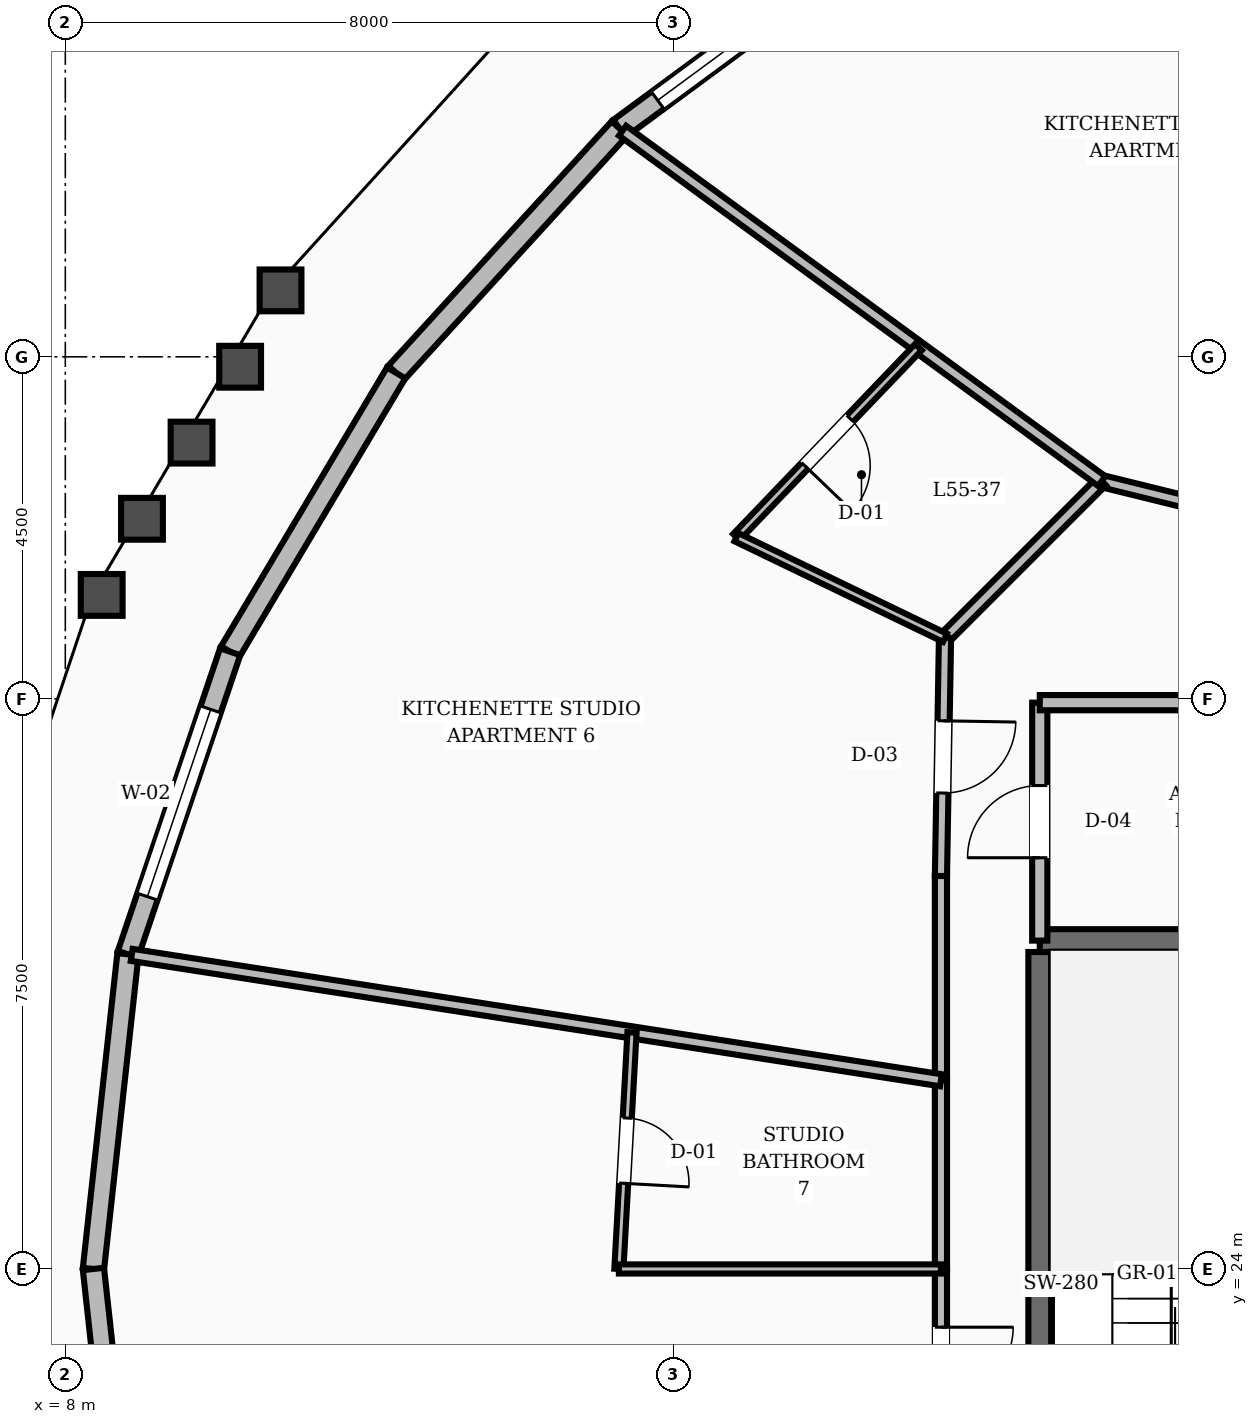
"""IFC4 building model, lengths in metres.
Left out: names, types, materials, properties, quantities, classifications, styles, units other than length and angle.
Written with IfcOpenShell. Run it as: python <this file> out.ifc"""

import sys

from ifc_helpers import new_model, si_unit, direction, frame, frame_2d, origin, place, context, subcontext, project, spatial, rectangle, extrude, element, fill, save


model = new_model("IFC4")
c1 = context("Model", 3, precision=1e-05, world=origin(), true_north=direction((0.0, 1.0)))
c2 = subcontext(c1, "Body", "Model", "MODEL_VIEW")
j1 = project(units=[si_unit("LENGTHUNIT", "METRE"), si_unit("PLANEANGLEUNIT", "RADIAN")], contexts=[c1])
p1 = place(None, origin())
s1 = spatial("IfcSite", under=j1, at=p1, CompositionType="ELEMENT")
p2 = place(p1, origin())
s2 = spatial("IfcBuilding", under=s1, at=p2, CompositionType="ELEMENT")
p3 = place(p2, frame((0.0, 0.0, 214.8)))
s3 = spatial("IfcBuildingStorey", under=s2, at=p3, CompositionType="ELEMENT", Elevation=214.8)
p4 = place(p3, frame((20.82, 19.43, 0.0), z_axis=(0.0, 0.0, 1.0), x_axis=(0.0, 1.0, 0.0)))
e1 = element("IfcWall", 1, at=p4, inside=s3, PredefinedType="SHEAR", context=c2, shape_type="SweptSolid", body=[
    extrude(rectangle(XDim=8.74, YDim=0.3, at=frame_2d((4.37, 0.0))), origin(), (0.0, 0.0, 1.0), 3.6),
])
p5 = place(p3, frame((20.82, 28.32, 0.0), z_axis=(0.0, 0.0, 1.0), x_axis=(1.0, 0.0, 0.0)))
e2 = element("IfcWall", 2, at=p5, inside=s3, PredefinedType="SHEAR", context=c2, shape_type="SweptSolid", body=[
    extrude(rectangle(XDim=3.6, YDim=0.3, at=frame_2d((1.8, 0.0))), origin(), (0.0, 0.0, 1.0), 3.6),
])
p6 = place(p3, frame((18.872, 41.643, 0.0), z_axis=(0.0, 0.0, 1.0), x_axis=(-0.8050103103, -0.593260819801, 0.0)))
e3 = element("IfcWall", 3, at=p6, inside=s3, PredefinedType="STANDARD", context=c2, shape_type="SweptSolid", body=[
    extrude(rectangle(XDim=4.448, YDim=0.28, at=frame_2d((2.224, 0.0))), origin(), (0.0, 0.0, 1.0), 2.88),
])
p7 = place(p6, frame((0.624, 0.0, 0.8)))
e4 = element("IfcOpeningElement", 4, at=p7, cuts=e3, PredefinedType="OPENING", context=c2, shape_type="SweptSolid", body=[
    extrude(rectangle(XDim=3.2, YDim=1.65, at=frame_2d((1.6, 0.825))), frame((0.0, 0.15, 0.0), z_axis=(0.0, -1.0, 0.0), x_axis=(1.0, 0.0, 0.0)), (0.0, 0.0, 1.0), 0.3),
])
p8 = place(p3, frame((15.291, 39.004, 0.0), z_axis=(0.0, 0.0, 1.0), x_axis=(-0.674642715371, -0.73814443478, 0.0)))
e5 = element("IfcWall", 5, at=p8, inside=s3, PredefinedType="STANDARD", context=c2, shape_type="SweptSolid", body=[
    extrude(rectangle(XDim=4.356, YDim=0.28, at=frame_2d((2.178, 0.0))), origin(), (0.0, 0.0, 1.0), 2.88),
])
p9 = place(p3, frame((12.352, 35.789, 0.0), z_axis=(0.0, 0.0, 1.0), x_axis=(-0.511481849, -0.859294081292, 0.0)))
e6 = element("IfcWall", 6, at=p9, inside=s3, PredefinedType="STANDARD", context=c2, shape_type="SweptSolid", body=[
    extrude(rectangle(XDim=4.269, YDim=0.28, at=frame_2d((2.135, 0.0))), origin(), (0.0, 0.0, 1.0), 2.88),
])
p10 = place(p3, frame((10.169, 32.12, 0.0), z_axis=(0.0, 0.0, 1.0), x_axis=(-0.320060327551, -0.947397164197, 0.0)))
e7 = element("IfcWall", 7, at=p10, inside=s3, PredefinedType="STANDARD", context=c2, shape_type="SweptSolid", body=[
    extrude(rectangle(XDim=4.201, YDim=0.28, at=frame_2d((2.101, 0.0))), origin(), (0.0, 0.0, 1.0), 2.88),
])
p11 = place(p10, frame((0.801, 0.0, 0.8)))
e8 = element("IfcOpeningElement", 8, at=p11, cuts=e7, PredefinedType="OPENING", context=c2, shape_type="SweptSolid", body=[
    extrude(rectangle(XDim=2.6, YDim=1.65, at=frame_2d((1.3, 0.825))), frame((0.0, 0.15, 0.0), z_axis=(0.0, -1.0, 0.0), x_axis=(1.0, 0.0, 0.0)), (0.0, 0.0, 1.0), 0.3),
])
for number, where, z_axis, x_axis in (
    (9, (8.824, 28.14, 0.0), (0.0, 0.0, 1.0), (-0.109, -0.994, 0.0)),
    (10, (8.37, 24.0, 0.0), (0.0, 0.0, 1.0), (0.109, -0.994, 0.0)),
):
    element("IfcWall", number, at=place(p3, frame(where, z_axis=z_axis, x_axis=x_axis)), inside=s3, PredefinedType="STANDARD", context=c2, shape_type="SweptSolid", body=[
        extrude(rectangle(XDim=4.165, YDim=0.28, at=frame_2d((2.082, 0.0))), origin(), (0.0, 0.0, 1.0), 2.88),
    ])
p12 = place(p3, frame((20.82, 28.32, 0.0), z_axis=(0.0, 0.0, 1.0), x_axis=(0.0, 1.0, 0.0)))
e11 = element("IfcWall", 11, at=p12, inside=s3, PredefinedType="SOLIDWALL", context=c2, shape_type="SweptSolid", body=[
    extrude(rectangle(XDim=3.13, YDim=0.2, at=frame_2d((1.565, 0.0))), origin(), (0.0, 0.0, 1.0), 2.87),
])
p13 = place(p12, frame((1.09, 0.0, 0.0)))
e12 = element("IfcOpeningElement", 12, at=p13, cuts=e11, PredefinedType="OPENING", context=c2, shape_type="SweptSolid", body=[
    extrude(rectangle(XDim=0.95, YDim=2.1, at=frame_2d((0.475, 1.05))), frame((0.0, 0.11, 0.0), z_axis=(0.0, -1.0, 0.0), x_axis=(1.0, 0.0, 0.0)), (0.0, 0.0, 1.0), 0.22),
])
p14 = place(p3, frame((20.82, 31.45, 0.0), z_axis=(0.0, 0.0, 1.0), x_axis=(1.0, 0.0, 0.0)))
e13 = element("IfcWall", 13, at=p14, inside=s3, PredefinedType="SOLIDWALL", context=c2, shape_type="SweptSolid", body=[
    extrude(rectangle(XDim=3.98, YDim=0.2, at=frame_2d((1.99, 0.0))), origin(), (0.0, 0.0, 1.0), 2.87),
])
p15 = place(p3, frame((25.752, 33.35, 0.0), z_axis=(0.0, 0.0, 1.0), x_axis=(-0.970939799552, 0.239323850978, 0.0)))
e14 = element("IfcWall", 14, at=p15, inside=s3, PredefinedType="SOLIDWALL", context=c2, shape_type="SweptSolid", body=[
    extrude(rectangle(XDim=4.241, YDim=0.16, at=frame_2d((2.12, 0.0))), origin(), (0.0, 0.0, 1.0), 2.87),
])
p16 = place(p3, frame((21.635, 34.365, 0.0), z_axis=(0.0, 0.0, 1.0), x_axis=(-0.707106781187, -0.707106781187, 0.0)))
e15 = element("IfcWall", 15, at=p16, inside=s3, PredefinedType="SOLIDWALL", context=c2, shape_type="SweptSolid", body=[
    extrude(rectangle(XDim=2.916, YDim=0.16, at=frame_2d((1.458, 0.0))), origin(), (0.0, 0.0, 1.0), 2.87),
])
p17 = place(p3, frame((19.573, 32.303, 0.0), z_axis=(0.0, 0.0, 1.0), x_axis=(-0.016981035134, -0.999855811828, 0.0)))
e16 = element("IfcWall", 16, at=p17, inside=s3, PredefinedType="SOLIDWALL", context=c2, shape_type="SweptSolid", body=[
    extrude(rectangle(XDim=3.134, YDim=0.16, at=frame_2d((1.567, 0.0))), origin(), (0.0, 0.0, 1.0), 2.87),
])
p18 = place(p17, frame((1.092, 0.0, 0.0)))
e17 = element("IfcOpeningElement", 17, at=p18, cuts=e16, PredefinedType="OPENING", context=c2, shape_type="SweptSolid", body=[
    extrude(rectangle(XDim=0.95, YDim=2.1, at=frame_2d((0.475, 1.05))), frame((0.0, 0.09, 0.0), z_axis=(0.0, -1.0, 0.0), x_axis=(1.0, 0.0, 0.0)), (0.0, 0.0, 1.0), 0.18),
])
p19 = place(p3, frame((19.52, 29.169, 0.0), z_axis=(0.0, 0.0, 1.0), x_axis=(0.0, -1.0, 0.0)))
e18 = element("IfcWall", 18, at=p19, inside=s3, PredefinedType="SOLIDWALL", context=c2, shape_type="SweptSolid", body=[
    extrude(rectangle(XDim=2.687, YDim=0.16, at=frame_2d((1.344, 0.0))), origin(), (0.0, 0.0, 1.0), 2.87),
])
p20 = place(p3, frame((19.52, 26.482, 0.0), z_axis=(0.0, 0.0, 1.0), x_axis=(0.0, -1.0, 0.0)))
e19 = element("IfcWall", 19, at=p20, inside=s3, PredefinedType="SOLIDWALL", context=c2, shape_type="SweptSolid", body=[
    extrude(rectangle(XDim=2.482, YDim=0.16, at=frame_2d((1.241, 0.0))), origin(), (0.0, 0.0, 1.0), 2.87),
])
p21 = place(p3, frame((19.52, 24.0, 0.0), z_axis=(0.0, 0.0, 1.0), x_axis=(0.0, -1.0, 0.0)))
e20 = element("IfcWall", 20, at=p21, inside=s3, PredefinedType="SOLIDWALL", context=c2, shape_type="SweptSolid", body=[
    extrude(rectangle(XDim=2.482, YDim=0.16, at=frame_2d((1.241, 0.0))), origin(), (0.0, 0.0, 1.0), 2.87),
])
p22 = place(p21, frame((0.766, 0.0, 0.0)))
e21 = element("IfcOpeningElement", 21, at=p22, cuts=e20, PredefinedType="OPENING", context=c2, shape_type="SweptSolid", body=[
    extrude(rectangle(XDim=0.95, YDim=2.1, at=frame_2d((0.475, 1.05))), frame((0.0, 0.09, 0.0), z_axis=(0.0, -1.0, 0.0), x_axis=(1.0, 0.0, 0.0)), (0.0, 0.0, 1.0), 0.18),
])
p23 = place(p3, frame((21.635, 34.365, 0.0), z_axis=(0.0, 0.0, 1.0), x_axis=(-0.807193456396, 0.5902869844, 0.0)))
e22 = element("IfcWall", 22, at=p23, inside=s3, PredefinedType="SOLIDWALL", context=c2, shape_type="SweptSolid", body=[
    extrude(rectangle(XDim=7.809, YDim=0.16, at=frame_2d((3.905, 0.0))), origin(), (0.0, 0.0, 1.0), 2.87),
])
p24 = place(p3, frame((19.224, 36.128, 0.0), z_axis=(0.0, 0.0, 1.0), x_axis=(-0.691782824038, -0.722105618567, 0.0)))
e23 = element("IfcWall", 23, at=p24, inside=s3, PredefinedType="PARTITIONING", context=c2, shape_type="SweptSolid", body=[
    extrude(rectangle(XDim=3.462, YDim=0.12, at=frame_2d((1.731, 0.0))), origin(), (0.0, 0.0, 1.0), 2.87),
])
p25 = place(p24, frame((1.301, 0.0, 0.0)))
e24 = element("IfcOpeningElement", 24, at=p25, cuts=e23, PredefinedType="OPENING", context=c2, shape_type="SweptSolid", body=[
    extrude(rectangle(XDim=0.86, YDim=2.1, at=frame_2d((0.43, 1.05))), frame((0.0, 0.07, 0.0), z_axis=(0.0, -1.0, 0.0), x_axis=(1.0, 0.0, 0.0)), (0.0, 0.0, 1.0), 0.14),
])
p26 = place(p3, frame((19.573, 32.303, 0.0), z_axis=(0.0, 0.0, 1.0), x_axis=(-0.900574352632, 0.434702007565, 0.0)))
e25 = element("IfcWall", 25, at=p26, inside=s3, PredefinedType="PARTITIONING", context=c2, shape_type="SweptSolid", body=[
    extrude(rectangle(XDim=3.047, YDim=0.12, at=frame_2d((1.523, 0.0))), origin(), (0.0, 0.0, 1.0), 2.87),
])
p27 = place(p3, frame((19.52, 26.482, 0.0), z_axis=(0.0, 0.0, 1.0), x_axis=(-0.988211347905, 0.15309582578, 0.0)))
e26 = element("IfcWall", 26, at=p27, inside=s3, PredefinedType="SOLIDWALL", context=c2, shape_type="SweptSolid", body=[
    extrude(rectangle(XDim=10.774, YDim=0.16, at=frame_2d((5.387, 0.0))), origin(), (0.0, 0.0, 1.0), 2.87),
])
p28 = place(p3, frame((15.456, 27.112, 0.0), z_axis=(0.0, 0.0, 1.0), x_axis=(-0.055378916224, -0.998465410336, 0.0)))
e27 = element("IfcWall", 27, at=p28, inside=s3, PredefinedType="PARTITIONING", context=c2, shape_type="SweptSolid", body=[
    extrude(rectangle(XDim=3.117, YDim=0.12, at=frame_2d((1.559, 0.0))), origin(), (0.0, 0.0, 1.0), 2.87),
])
p29 = place(p28, frame((1.128, 0.0, 0.0)))
e28 = element("IfcOpeningElement", 28, at=p29, cuts=e27, PredefinedType="OPENING", context=c2, shape_type="SweptSolid", body=[
    extrude(rectangle(XDim=0.86, YDim=2.1, at=frame_2d((0.43, 1.05))), frame((0.0, 0.07, 0.0), z_axis=(0.0, -1.0, 0.0), x_axis=(1.0, 0.0, 0.0)), (0.0, 0.0, 1.0), 0.14),
])
p30 = place(p3, frame((19.52, 24.0, 0.0), z_axis=(0.0, 0.0, 1.0), x_axis=(-1.0, 0.0, 0.0)))
e29 = element("IfcWall", 29, at=p30, inside=s3, PredefinedType="PARTITIONING", context=c2, shape_type="SweptSolid", body=[
    extrude(rectangle(XDim=4.237, YDim=0.12, at=frame_2d((2.119, 0.0))), origin(), (0.0, 0.0, 1.0), 2.87),
])
p31 = place(p7, origin())
e30 = element("IfcWindow", 30, at=p31, inside=s3, PartitioningType="SINGLE_PANEL", PredefinedType="WINDOW", context=c2, shape_type="SweptSolid", body=[
    extrude(rectangle(XDim=3.2, YDim=1.65, at=frame_2d((1.6, 0.825))), frame((0.0, 0.03, 0.0), z_axis=(0.0, -1.0, 0.0), x_axis=(1.0, 0.0, 0.0)), (0.0, 0.0, 1.0), 0.06),
])
fill(e4, e30)
p32 = place(p11, origin())
e31 = element("IfcWindow", 31, at=p32, inside=s3, PartitioningType="SINGLE_PANEL", PredefinedType="WINDOW", context=c2, shape_type="SweptSolid", body=[
    extrude(rectangle(XDim=2.6, YDim=1.65, at=frame_2d((1.3, 0.825))), frame((0.0, 0.03, 0.0), z_axis=(0.0, -1.0, 0.0), x_axis=(1.0, 0.0, 0.0)), (0.0, 0.0, 1.0), 0.06),
])
fill(e8, e31)
p33 = place(p13, origin())
e32 = element("IfcDoor", 32, at=p33, inside=s3, OperationType="SINGLE_SWING_LEFT", PredefinedType="DOOR", context=c2, shape_type="SweptSolid", body=[
    extrude(rectangle(XDim=0.95, YDim=2.1, at=frame_2d((0.475, 1.05))), frame((0.0, 0.025, 0.0), z_axis=(0.0, -1.0, 0.0), x_axis=(1.0, 0.0, 0.0)), (0.0, 0.0, 1.0), 0.05),
])
fill(e12, e32)
p34 = place(p25, origin())
e33 = element("IfcDoor", 33, at=p34, inside=s3, OperationType="SINGLE_SWING_RIGHT", PredefinedType="DOOR", context=c2, shape_type="SweptSolid", body=[
    extrude(rectangle(XDim=0.86, YDim=2.1, at=frame_2d((0.43, 1.05))), frame((0.0, 0.025, 0.0), z_axis=(0.0, -1.0, 0.0), x_axis=(1.0, 0.0, 0.0)), (0.0, 0.0, 1.0), 0.05),
])
fill(e24, e33)
p35 = place(p18, origin())
e34 = element("IfcDoor", 34, at=p35, inside=s3, OperationType="SINGLE_SWING_LEFT", PredefinedType="DOOR", context=c2, shape_type="SweptSolid", body=[
    extrude(rectangle(XDim=0.95, YDim=2.1, at=frame_2d((0.475, 1.05))), frame((0.0, 0.025, 0.0), z_axis=(0.0, -1.0, 0.0), x_axis=(1.0, 0.0, 0.0)), (0.0, 0.0, 1.0), 0.05),
])
fill(e17, e34)
p36 = place(p29, origin())
e35 = element("IfcDoor", 35, at=p36, inside=s3, OperationType="SINGLE_SWING_RIGHT", PredefinedType="DOOR", context=c2, shape_type="SweptSolid", body=[
    extrude(rectangle(XDim=0.86, YDim=2.1, at=frame_2d((0.43, 1.05))), frame((0.0, 0.025, 0.0), z_axis=(0.0, -1.0, 0.0), x_axis=(1.0, 0.0, 0.0)), (0.0, 0.0, 1.0), 0.05),
])
fill(e28, e35)
p37 = place(p22, origin())
e36 = element("IfcDoor", 36, at=p37, inside=s3, OperationType="SINGLE_SWING_LEFT", PredefinedType="DOOR", context=c2, shape_type="SweptSolid", body=[
    extrude(rectangle(XDim=0.95, YDim=2.1, at=frame_2d((0.475, 1.05))), frame((0.0, 0.025, 0.0), z_axis=(0.0, -1.0, 0.0), x_axis=(1.0, 0.0, 0.0)), (0.0, 0.0, 1.0), 0.05),
])
fill(e21, e36)
save(model, sys.argv[1])
